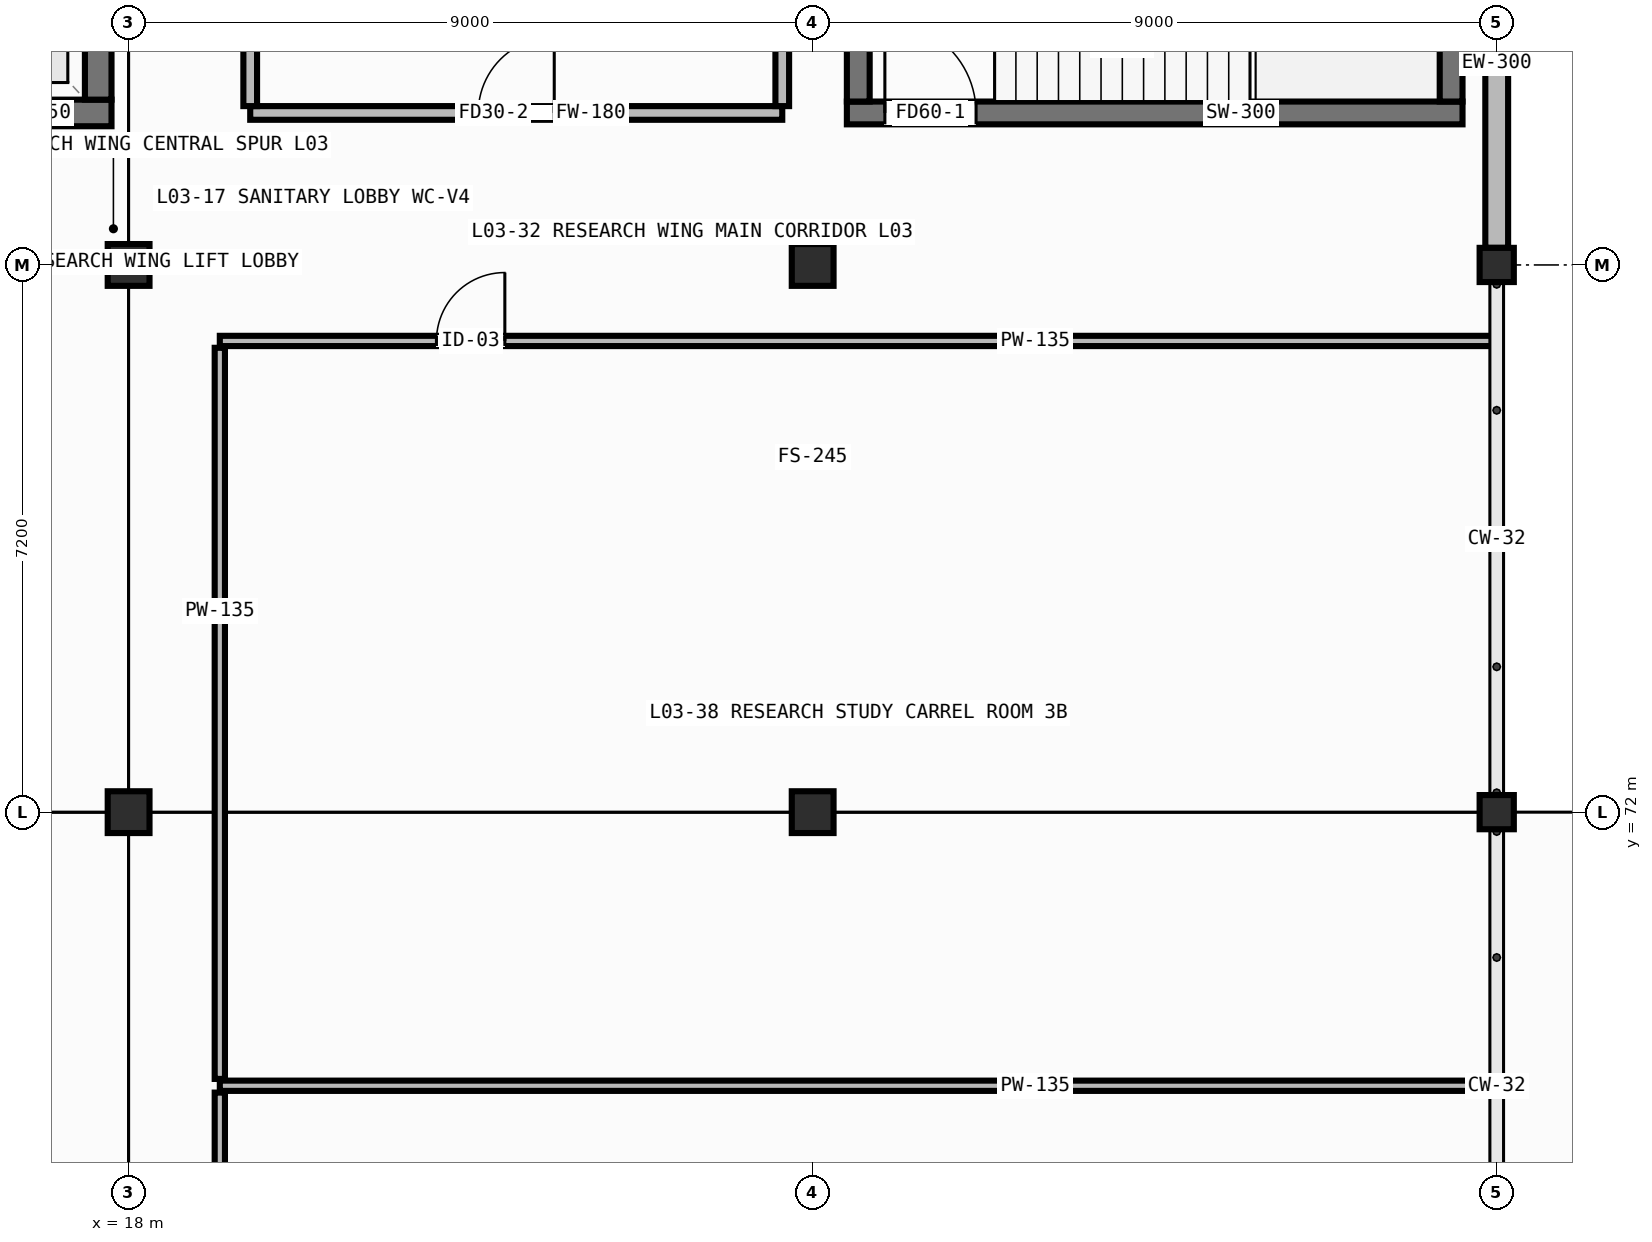
"""IFC4 building model, lengths in metres.
Left out: names, types, materials, properties, quantities, classifications, styles, units other than length and angle.
Written with IfcOpenShell. Run it as: python <this file> out.ifc"""

import sys

from ifc_helpers import new_model, si_unit, direction, frame, frame_2d, origin, origin_2d, place, context, subcontext, project, spatial, rectangle, hollow_rectangle, extrude, element, fill, save


model = new_model("IFC4")
c1 = context("Model", 3, precision=1e-05, world=origin(), true_north=direction((0.0, 1.0)))
c2 = subcontext(c1, "Body", "Model", "MODEL_VIEW")
j1 = project(units=[si_unit("LENGTHUNIT", "METRE"), si_unit("PLANEANGLEUNIT", "RADIAN")], contexts=[c1])
p1 = place(None, origin())
s1 = spatial("IfcSite", under=j1, at=p1, CompositionType="ELEMENT")
p2 = place(p1, origin())
s2 = spatial("IfcBuilding", under=s1, at=p2, CompositionType="ELEMENT")
p3 = place(p2, frame((0.0, 0.0, 8.8)))
s3 = spatial("IfcBuildingStorey", under=s2, at=p3, CompositionType="ELEMENT", Elevation=8.8)
for number, where, z_axis, x_axis in (
    (1, (18.0, 72.0, 0.0), (0.0, 0.0, 1.0), (1.0, 0.0, 0.0)),
    (2, (18.0, 79.2, 0.0), (0.0, 0.0, 1.0), (1.0, 0.0, 0.0)),
    (3, (27.0, 72.0, 0.0), (0.0, 0.0, 1.0), (1.0, 0.0, 0.0)),
    (4, (27.0, 79.2, 0.0), (0.0, 0.0, 1.0), (1.0, 0.0, 0.0)),
):
    element("IfcColumn", number, at=place(p3, frame(where, z_axis=z_axis, x_axis=x_axis)), inside=s3, PredefinedType="COLUMN", context=c2, shape_type="SweptSolid", body=[
        extrude(hollow_rectangle(XDim=0.55, YDim=0.55, WallThickness=0.022, at=origin_2d()), origin(), (0.0, 0.0, 1.0), 4.0),
    ])
for number, where, z_axis, x_axis in (
    (5, (36.0, 72.0, 0.0), (0.0, 0.0, 1.0), (1.0, 0.0, 0.0)),
    (6, (36.0, 79.2, 0.0), (0.0, 0.0, 1.0), (1.0, 0.0, 0.0)),
):
    element("IfcColumn", number, at=place(p3, frame(where, z_axis=z_axis, x_axis=x_axis)), inside=s3, PredefinedType="COLUMN", context=c2, shape_type="SweptSolid", body=[
        extrude(hollow_rectangle(XDim=0.45, YDim=0.45, WallThickness=0.019, at=origin_2d()), origin(), (0.0, 0.0, 1.0), 4.0),
    ])
p4 = place(p3, frame((36.0, 86.175, 0.0), z_axis=(0.0, 0.0, 1.0), x_axis=(0.0, -1.0, 0.0)))
e7 = element("IfcWall", 7, at=p4, inside=s3, PredefinedType="STANDARD", context=c2, shape_type="SweptSolid", body=[
    extrude(rectangle(XDim=6.75, YDim=0.3, at=frame_2d((3.375, 0.0))), origin(), (0.0, 0.0, 1.0), 3.295),
])
p5 = place(p3, frame((27.45, 81.2, 0.0), z_axis=(0.0, 0.0, 1.0), x_axis=(1.0, 0.0, 0.0)))
e8 = element("IfcWall", 8, at=p5, inside=s3, PredefinedType="SHEAR", context=c2, shape_type="SweptSolid", body=[
    extrude(rectangle(XDim=8.1, YDim=0.3, at=frame_2d((4.05, 0.0))), origin(), (0.0, 0.0, 1.0), 3.745),
])
p6 = place(p5, frame((0.5, 0.0, 0.0)))
e9 = element("IfcOpeningElement", 9, at=p6, cuts=e8, PredefinedType="OPENING", context=c2, shape_type="SweptSolid", body=[
    extrude(rectangle(XDim=1.2, YDim=2.1, at=frame_2d((0.6, 1.05))), frame((0.0, 0.162, 0.0), z_axis=(0.0, -1.0, 0.0), x_axis=(1.0, 0.0, 0.0)), (0.0, 0.0, 1.0), 0.324),
])
for number, where, z_axis, x_axis in (
    (10, (27.6, 81.35, 0.0), (0.0, 0.0, 1.0), (0.0, 1.0, 0.0)),
    (11, (35.4, 81.35, 0.0), (0.0, 0.0, 1.0), (0.0, 1.0, 0.0)),
):
    element("IfcWall", number, at=place(p3, frame(where, z_axis=z_axis, x_axis=x_axis)), inside=s3, PredefinedType="SHEAR", context=c2, shape_type="SweptSolid", body=[
        extrude(rectangle(XDim=3.8, YDim=0.3, at=frame_2d((1.9, 0.0))), origin(), (0.0, 0.0, 1.0), 3.745),
    ])
p7 = place(p3, frame((15.025, 81.2, 0.0), z_axis=(0.0, 0.0, 1.0), x_axis=(1.0, 0.0, 0.0)))
e12 = element("IfcWall", 12, at=p7, inside=s3, PredefinedType="SHEAR", context=c2, shape_type="SweptSolid", body=[
    extrude(rectangle(XDim=2.75, YDim=0.35, at=frame_2d((1.375, 0.0))), origin(), (0.0, 0.0, 1.0), 3.745),
])
p8 = place(p7, frame((0.825, 0.0, 0.0)))
e13 = element("IfcOpeningElement", 13, at=p8, cuts=e12, PredefinedType="OPENING", context=c2, shape_type="SweptSolid", body=[
    extrude(rectangle(XDim=1.1, YDim=2.1, at=frame_2d((0.55, 1.05))), frame((0.0, 0.187, 0.0), z_axis=(0.0, -1.0, 0.0), x_axis=(1.0, 0.0, 0.0)), (0.0, 0.0, 1.0), 0.374),
])
p9 = place(p3, frame((17.6, 81.375, 0.0), z_axis=(0.0, 0.0, 1.0), x_axis=(0.0, 1.0, 0.0)))
e14 = element("IfcWall", 14, at=p9, inside=s3, PredefinedType="SHEAR", context=c2, shape_type="SweptSolid", body=[
    extrude(rectangle(XDim=2.25, YDim=0.35, at=frame_2d((1.125, 0.0))), origin(), (0.0, 0.0, 1.0), 3.745),
])
p10 = place(p3, frame((19.6, 81.2, 0.0), z_axis=(0.0, 0.0, 1.0), x_axis=(1.0, 0.0, 0.0)))
e15 = element("IfcWall", 15, at=p10, inside=s3, PredefinedType="PARTITIONING", context=c2, shape_type="SweptSolid", body=[
    extrude(rectangle(XDim=7.0, YDim=0.18, at=frame_2d((3.5, 0.0))), origin(), (0.0, 0.0, 1.0), 3.745),
])
p11 = place(p10, frame((3.0, 0.0, 0.0)))
e16 = element("IfcOpeningElement", 16, at=p11, cuts=e15, PredefinedType="OPENING", context=c2, shape_type="SweptSolid", body=[
    extrude(rectangle(XDim=1.0, YDim=2.08, at=frame_2d((0.5, 1.04))), frame((0.0, 0.102, 0.0), z_axis=(0.0, -1.0, 0.0), x_axis=(1.0, 0.0, 0.0)), (0.0, 0.0, 1.0), 0.204),
])
for number, where, z_axis, x_axis in (
    (17, (19.6, 81.29, 0.0), (0.0, 0.0, 1.0), (0.0, 1.0, 0.0)),
    (18, (26.6, 81.29, 0.0), (0.0, 0.0, 1.0), (0.0, 1.0, 0.0)),
):
    element("IfcWall", number, at=place(p3, frame(where, z_axis=z_axis, x_axis=x_axis)), inside=s3, PredefinedType="PARTITIONING", context=c2, shape_type="SweptSolid", body=[
        extrude(rectangle(XDim=2.22, YDim=0.18, at=frame_2d((1.11, 0.0))), origin(), (0.0, 0.0, 1.0), 3.745),
    ])
p12 = place(p3, frame((19.2, 68.4, 0.0), z_axis=(0.0, 0.0, 1.0), x_axis=(1.0, 0.0, 0.0)))
e19 = element("IfcWall", 19, at=p12, inside=s3, PredefinedType="PARTITIONING", context=c2, shape_type="SweptSolid", body=[
    extrude(rectangle(XDim=16.765, YDim=0.135, at=frame_2d((8.383, 0.0))), origin(), (0.0, 0.0, 1.0), 3.315),
])
p13 = place(p3, frame((19.2, 57.765, 0.0), z_axis=(0.0, 0.0, 1.0), x_axis=(0.0, 1.0, 0.0)))
e20 = element("IfcWall", 20, at=p13, inside=s3, PredefinedType="PARTITIONING", context=c2, shape_type="SweptSolid", body=[
    extrude(rectangle(XDim=10.545, YDim=0.135, at=frame_2d((5.272, 0.0))), origin(), (0.0, 0.0, 1.0), 3.78),
])
p14 = place(p13, frame((7.975, 0.0, 0.0)))
e21 = element("IfcOpeningElement", 21, at=p14, cuts=e20, PredefinedType="OPENING", context=c2, shape_type="SweptSolid", body=[
    extrude(rectangle(XDim=0.92, YDim=2.06, at=frame_2d((0.46, 1.03))), frame((0.0, 0.08, 0.0), z_axis=(0.0, -1.0, 0.0), x_axis=(1.0, 0.0, 0.0)), (0.0, 0.0, 1.0), 0.159),
])
p15 = place(p3, frame((19.2, 78.2, 0.0), z_axis=(0.0, 0.0, 1.0), x_axis=(1.0, 0.0, 0.0)))
e22 = element("IfcWall", 22, at=p15, inside=s3, PredefinedType="PARTITIONING", context=c2, shape_type="SweptSolid", body=[
    extrude(rectangle(XDim=16.765, YDim=0.135, at=frame_2d((8.383, 0.0))), origin(), (0.0, 0.0, 1.0), 3.745),
])
p16 = place(p15, frame((2.85, 0.0, 0.0)))
e23 = element("IfcOpeningElement", 23, at=p16, cuts=e22, PredefinedType="OPENING", context=c2, shape_type="SweptSolid", body=[
    extrude(rectangle(XDim=0.9, YDim=2.02, at=frame_2d((0.45, 1.01))), frame((0.0, 0.08, 0.0), z_axis=(0.0, -1.0, 0.0), x_axis=(1.0, 0.0, 0.0)), (0.0, 0.0, 1.0), 0.159),
])
p17 = place(p3, frame((19.2, 68.49, 0.0), z_axis=(0.0, 0.0, 1.0), x_axis=(0.0, 1.0, 0.0)))
e24 = element("IfcWall", 24, at=p17, inside=s3, PredefinedType="PARTITIONING", context=c2, shape_type="SweptSolid", body=[
    extrude(rectangle(XDim=9.62, YDim=0.135, at=frame_2d((4.81, 0.0))), origin(), (0.0, 0.0, 1.0), 3.745),
])
p18 = place(p6, origin())
e25 = element("IfcDoor", 25, at=p18, inside=s3, OperationType="SINGLE_SWING_LEFT", PredefinedType="DOOR", context=c2, shape_type="SweptSolid", body=[
    extrude(rectangle(XDim=1.2, YDim=2.1, at=frame_2d((0.6, 1.05))), frame((0.0, 0.025, 0.0), z_axis=(0.0, -1.0, 0.0), x_axis=(1.0, 0.0, 0.0)), (0.0, 0.0, 1.0), 0.05),
])
fill(e9, e25)
p19 = place(p11, origin())
e26 = element("IfcDoor", 26, at=p19, inside=s3, OperationType="SINGLE_SWING_RIGHT", PredefinedType="DOOR", context=c2, shape_type="SweptSolid", body=[
    extrude(rectangle(XDim=1.0, YDim=2.08, at=frame_2d((0.5, 1.04))), frame((0.0, 0.025, 0.0), z_axis=(0.0, -1.0, 0.0), x_axis=(1.0, 0.0, 0.0)), (0.0, 0.0, 1.0), 0.05),
])
fill(e16, e26)
p20 = place(p16, origin())
e27 = element("IfcDoor", 27, at=p20, inside=s3, OperationType="SINGLE_SWING_RIGHT", PredefinedType="DOOR", context=c2, shape_type="SweptSolid", body=[
    extrude(rectangle(XDim=0.9, YDim=2.02, at=frame_2d((0.45, 1.01))), frame((0.0, 0.025, 0.0), z_axis=(0.0, -1.0, 0.0), x_axis=(1.0, 0.0, 0.0)), (0.0, 0.0, 1.0), 0.05),
])
fill(e23, e27)
save(model, sys.argv[1])
